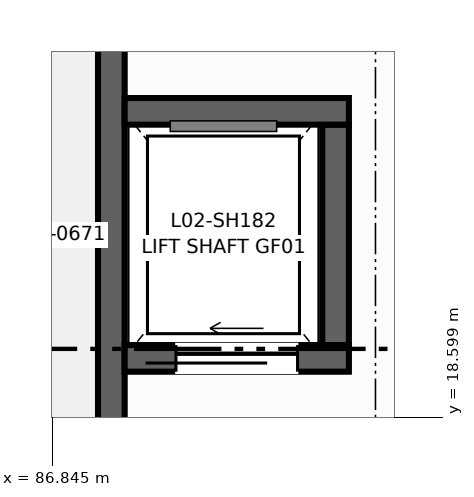
"""IFC4 building model, lengths in metres.
Left out: names, types, materials, properties, quantities, classifications, styles, units other than length and angle.
Written with IfcOpenShell. Run it as: python <this file> out.ifc"""

import sys

from ifc_helpers import new_model, si_unit, direction, frame, frame_2d, origin, place, context, subcontext, project, spatial, rectangle, extrude, element, fill, save


model = new_model("IFC4")
c1 = context("Model", 3, precision=1e-05, world=origin(), true_north=direction((0.0, 1.0)))
c2 = subcontext(c1, "Body", "Model", "MODEL_VIEW")
j1 = project(units=[si_unit("LENGTHUNIT", "METRE"), si_unit("PLANEANGLEUNIT", "RADIAN")], contexts=[c1])
p1 = place(None, origin())
s1 = spatial("IfcSite", under=j1, at=p1, CompositionType="ELEMENT")
p2 = place(p1, origin())
s2 = spatial("IfcBuilding", under=s1, at=p2, CompositionType="ELEMENT")
p3 = place(p2, frame((0.0, 0.0, 9.0)))
s3 = spatial("IfcBuildingStorey", under=s2, at=p3, CompositionType="ELEMENT", Elevation=9.0)
p4 = place(p3, frame((87.625, 18.5, 0.0), z_axis=(0.0, 0.0, 1.0), x_axis=(0.0, 1.0, 0.0)))
e1 = element("IfcWall", 1, at=p4, inside=s3, PredefinedType="SHEAR", context=c2, shape_type="SweptSolid", body=[
    extrude(rectangle(XDim=5.0, YDim=0.35, at=frame_2d((2.5, 0.0))), origin(), (0.0, 0.0, 1.0), 4.25),
])
p5 = place(p3, frame((90.575, 19.55, 0.0), z_axis=(0.0, 0.0, 1.0), x_axis=(0.0, 1.0, 0.0)))
e2 = element("IfcWall", 2, at=p5, inside=s3, PredefinedType="SHEAR", context=c2, shape_type="SweptSolid", body=[
    extrude(rectangle(XDim=2.9, YDim=0.35, at=frame_2d((1.45, 0.0))), origin(), (0.0, 0.0, 1.0), 4.25),
])
p6 = place(p3, frame((87.8, 19.375, 0.0), z_axis=(0.0, 0.0, 1.0), x_axis=(1.0, 0.0, 0.0)))
e3 = element("IfcWall", 3, at=p6, inside=s3, PredefinedType="SHEAR", context=c2, shape_type="SweptSolid", body=[
    extrude(rectangle(XDim=2.95, YDim=0.35, at=frame_2d((1.475, 0.0))), origin(), (0.0, 0.0, 1.0), 4.25),
])
p7 = place(p6, frame((0.675, 0.0, 0.0)))
e4 = element("IfcOpeningElement", 4, at=p7, cuts=e3, PredefinedType="OPENING", context=c2, shape_type="SweptSolid", body=[
    extrude(rectangle(XDim=1.6, YDim=2.35, at=frame_2d((0.8, 1.175))), frame((0.0, 0.185, 0.0), z_axis=(0.0, -1.0, 0.0), x_axis=(1.0, 0.0, 0.0)), (0.0, 0.0, 1.0), 0.37),
])
p8 = place(p3, frame((87.8, 22.625, 0.0), z_axis=(0.0, 0.0, 1.0), x_axis=(1.0, 0.0, 0.0)))
e5 = element("IfcWall", 5, at=p8, inside=s3, PredefinedType="SHEAR", context=c2, shape_type="SweptSolid", body=[
    extrude(rectangle(XDim=2.95, YDim=0.35, at=frame_2d((1.475, 0.0))), origin(), (0.0, 0.0, 1.0), 4.25),
])
p9 = place(p7, origin())
e6 = element("IfcDoor", 6, at=p9, inside=s3, OperationType="SLIDING_TO_LEFT", PredefinedType="DOOR", context=c2, shape_type="SweptSolid", body=[
    extrude(rectangle(XDim=1.6, YDim=2.35, at=frame_2d((0.8, 1.175))), frame((0.0, 0.025, 0.0), z_axis=(0.0, -1.0, 0.0), x_axis=(1.0, 0.0, 0.0)), (0.0, 0.0, 1.0), 0.05),
])
fill(e4, e6)
save(model, sys.argv[1])
